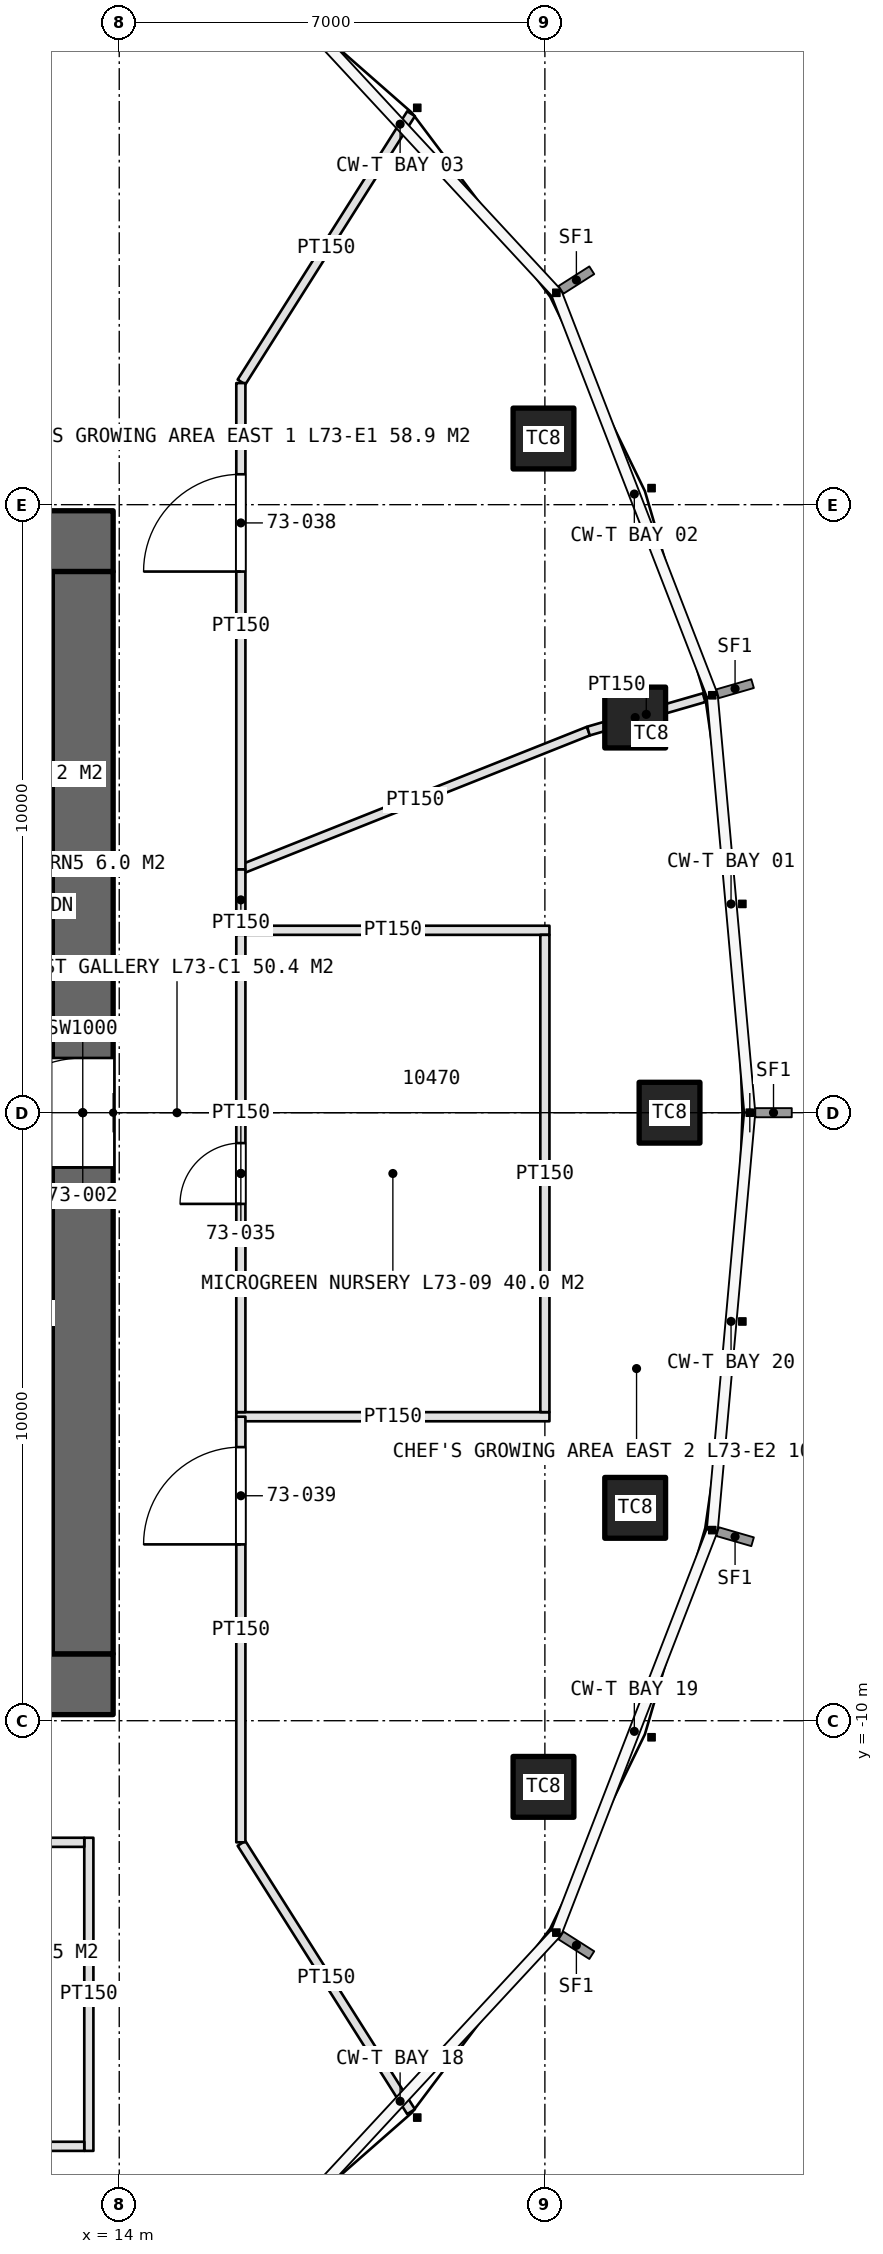
"""IFC4 building model, lengths in metres.
Left out: names, types, materials, properties, quantities, classifications, styles, units other than length and angle.
Written with IfcOpenShell. Run it as: python <this file> out.ifc"""

import sys

from ifc_helpers import new_model, si_unit, direction, frame, frame_2d, origin, origin_2d, place, context, subcontext, project, spatial, rectangle, extrude, element, fill, save


model = new_model("IFC4")
c1 = context("Model", 3, precision=1e-05, world=origin(), true_north=direction((0.0, 1.0)))
c2 = subcontext(c1, "Body", "Model", "MODEL_VIEW")
j1 = project(units=[si_unit("LENGTHUNIT", "METRE"), si_unit("PLANEANGLEUNIT", "RADIAN")], contexts=[c1])
p1 = place(None, origin())
s1 = spatial("IfcSite", under=j1, at=p1, CompositionType="ELEMENT")
p2 = place(p1, origin())
s2 = spatial("IfcBuilding", under=s1, at=p2, CompositionType="ELEMENT")
p3 = place(p2, frame((0.0, 0.0, 325.8)))
s3 = spatial("IfcBuildingStorey", under=s2, at=p3, CompositionType="ELEMENT", Elevation=325.8)
p4 = place(p3, frame((-13.9, -9.4, 0.0), z_axis=(0.0, 0.0, 1.0), x_axis=(1.0, 0.0, 0.0)))
e1 = element("IfcWall", 1, at=p4, inside=s3, PredefinedType="SHEAR", context=c2, shape_type="SweptSolid", body=[
    extrude(rectangle(XDim=27.8, YDim=1.0, at=frame_2d((13.9, 0.0))), origin(), (0.0, 0.0, 1.0), 4.2),
])
p5 = place(p4, frame((22.95, 0.0, 0.0)))
e2 = element("IfcOpeningElement", 2, at=p5, cuts=e1, PredefinedType="OPENING", context=c2, shape_type="SweptSolid", body=[
    extrude(rectangle(XDim=2.2, YDim=2.7, at=frame_2d((1.1, 1.35))), frame((0.0, 0.51, 0.0), z_axis=(0.0, -1.0, 0.0), x_axis=(1.0, 0.0, 0.0)), (0.0, 0.0, 1.0), 1.02),
])
p6 = place(p3, frame((13.9, 9.4, 0.0), z_axis=(0.0, 0.0, 1.0), x_axis=(-1.0, 0.0, 0.0)))
e3 = element("IfcWall", 3, at=p6, inside=s3, PredefinedType="SHEAR", context=c2, shape_type="SweptSolid", body=[
    extrude(rectangle(XDim=27.8, YDim=1.0, at=frame_2d((13.9, 0.0))), origin(), (0.0, 0.0, 1.0), 4.2),
])
p7 = place(p6, frame((23.9, 0.0, 0.0)))
e4 = element("IfcOpeningElement", 4, at=p7, cuts=e3, PredefinedType="OPENING", context=c2, shape_type="SweptSolid", body=[
    extrude(rectangle(XDim=1.0, YDim=2.4, at=frame_2d((0.5, 1.2))), frame((0.0, 0.51, 0.0), z_axis=(0.0, -1.0, 0.0), x_axis=(1.0, 0.0, 0.0)), (0.0, 0.0, 1.0), 1.02),
])
p8 = place(p6, frame((13.0, 0.0, 0.0)))
e5 = element("IfcOpeningElement", 5, at=p8, cuts=e3, PredefinedType="OPENING", context=c2, shape_type="SweptSolid", body=[
    extrude(rectangle(XDim=1.8, YDim=2.4, at=frame_2d((0.9, 1.2))), frame((0.0, 0.51, 0.0), z_axis=(0.0, -1.0, 0.0), x_axis=(1.0, 0.0, 0.0)), (0.0, 0.0, 1.0), 1.02),
])
p9 = place(p3, frame((13.4, -8.9, 0.0), z_axis=(0.0, 0.0, 1.0), x_axis=(0.0, 1.0, 0.0)))
e6 = element("IfcWall", 6, at=p9, inside=s3, PredefinedType="SHEAR", context=c2, shape_type="SweptSolid", body=[
    extrude(rectangle(XDim=17.8, YDim=1.0, at=frame_2d((8.9, 0.0))), origin(), (0.0, 0.0, 1.0), 4.2),
])
p10 = place(p9, frame((8.0, 0.0, 0.0)))
e7 = element("IfcOpeningElement", 7, at=p10, cuts=e6, PredefinedType="OPENING", context=c2, shape_type="SweptSolid", body=[
    extrude(rectangle(XDim=1.8, YDim=2.4, at=frame_2d((0.9, 1.2))), frame((0.0, 0.51, 0.0), z_axis=(0.0, -1.0, 0.0), x_axis=(1.0, 0.0, 0.0)), (0.0, 0.0, 1.0), 1.02),
])
p11 = place(p3, frame((7.2, 1.6, 0.0), z_axis=(0.0, 0.0, 1.0), x_axis=(1.0, 0.0, 0.0)))
e8 = element("IfcWall", 8, at=p11, inside=s3, PredefinedType="SHEAR", context=c2, shape_type="SweptSolid", body=[
    extrude(rectangle(XDim=5.7, YDim=0.4, at=frame_2d((2.85, 0.0))), origin(), (0.0, 0.0, 1.0), 4.2),
])
p12 = place(p11, frame((0.7, 0.0, 0.0)))
e9 = element("IfcOpeningElement", 9, at=p12, cuts=e8, PredefinedType="OPENING", context=c2, shape_type="SweptSolid", body=[
    extrude(rectangle(XDim=1.0, YDim=2.4, at=frame_2d((0.5, 1.2))), frame((0.0, 0.21, 0.0), z_axis=(0.0, -1.0, 0.0), x_axis=(1.0, 0.0, 0.0)), (0.0, 0.0, 1.0), 0.42),
])
p13 = place(p3, frame((7.2, -1.6, 0.0), z_axis=(0.0, 0.0, 1.0), x_axis=(1.0, 0.0, 0.0)))
e10 = element("IfcWall", 10, at=p13, inside=s3, PredefinedType="SHEAR", context=c2, shape_type="SweptSolid", body=[
    extrude(rectangle(XDim=5.7, YDim=0.4, at=frame_2d((2.85, 0.0))), origin(), (0.0, 0.0, 1.0), 4.2),
])
p14 = place(p13, frame((0.9, 0.0, 0.0)))
e11 = element("IfcOpeningElement", 11, at=p14, cuts=e10, PredefinedType="OPENING", context=c2, shape_type="SweptSolid", body=[
    extrude(rectangle(XDim=1.3, YDim=2.4, at=frame_2d((0.65, 1.2))), frame((0.0, 0.21, 0.0), z_axis=(0.0, -1.0, 0.0), x_axis=(1.0, 0.0, 0.0)), (0.0, 0.0, 1.0), 0.42),
])
p15 = place(p13, frame((3.95, 0.0, 0.0)))
e12 = element("IfcOpeningElement", 12, at=p15, cuts=e10, PredefinedType="OPENING", context=c2, shape_type="SweptSolid", body=[
    extrude(rectangle(XDim=1.3, YDim=2.4, at=frame_2d((0.65, 1.2))), frame((0.0, 0.21, 0.0), z_axis=(0.0, -1.0, 0.0), x_axis=(1.0, 0.0, 0.0)), (0.0, 0.0, 1.0), 0.42),
])
p16 = place(p3, frame((7.2, -5.0, 0.0), z_axis=(0.0, 0.0, 1.0), x_axis=(1.0, 0.0, 0.0)))
e13 = element("IfcWall", 13, at=p16, inside=s3, PredefinedType="SHEAR", context=c2, shape_type="SweptSolid", body=[
    extrude(rectangle(XDim=5.7, YDim=0.4, at=frame_2d((2.85, 0.0))), origin(), (0.0, 0.0, 1.0), 4.2),
])
for number, where, z_axis, x_axis in (
    (14, (23.05, 0.0, 0.0), (0.0, 0.0, 1.0), (1.0, 0.0, 0.0)),
    (15, (22.485, 6.499, 0.0), (0.0, 0.0, 1.0), (1.0, 0.0, 0.0)),
    (16, (20.977, 11.088, 0.0), (0.0, 0.0, 1.0), (1.0, 0.0, 0.0)),
    (17, (20.977, -11.088, 0.0), (0.0, 0.0, 1.0), (1.0, 0.0, 0.0)),
    (18, (22.485, -6.499, 0.0), (0.0, 0.0, 1.0), (1.0, 0.0, 0.0)),
):
    element("IfcColumn", number, at=place(p3, frame(where, z_axis=z_axis, x_axis=x_axis)), inside=s3, PredefinedType="COLUMN", context=c2, shape_type="SweptSolid", body=[
        extrude(rectangle(XDim=1.0, YDim=1.0, at=origin_2d()), origin(), (0.0, 0.0, 1.0), 4.2),
    ])
for number, where, z_axis, x_axis in (
    (19, (15.925, -5.0, 0.0), (0.0, 0.0, 1.0), (1.0, 0.0, 0.0)),
    (20, (15.925, 3.0, 0.0), (0.0, 0.0, 1.0), (1.0, 0.0, 0.0)),
):
    element("IfcWall", number, at=place(p3, frame(where, z_axis=z_axis, x_axis=x_axis)), inside=s3, PredefinedType="PARTITIONING", context=c2, shape_type="SweptSolid", body=[
        extrude(rectangle(XDim=5.15, YDim=0.15, at=frame_2d((2.575, 0.0))), origin(), (0.0, 0.0, 1.0), 3.0),
    ])
p17 = place(p3, frame((16.0, -4.925, 0.0), z_axis=(0.0, 0.0, 1.0), x_axis=(0.0, 1.0, 0.0)))
e21 = element("IfcWall", 21, at=p17, inside=s3, PredefinedType="PARTITIONING", context=c2, shape_type="SweptSolid", body=[
    extrude(rectangle(XDim=7.85, YDim=0.15, at=frame_2d((3.925, 0.0))), origin(), (0.0, 0.0, 1.0), 3.0),
])
p18 = place(p17, frame((3.425, 0.0, 0.0)))
e22 = element("IfcOpeningElement", 22, at=p18, cuts=e21, PredefinedType="OPENING", context=c2, shape_type="SweptSolid", body=[
    extrude(rectangle(XDim=1.0, YDim=2.2, at=frame_2d((0.5, 1.1))), frame((0.0, 0.085, 0.0), z_axis=(0.0, -1.0, 0.0), x_axis=(1.0, 0.0, 0.0)), (0.0, 0.0, 1.0), 0.17),
])
p19 = place(p3, frame((21.0, -4.925, 0.0), z_axis=(0.0, 0.0, 1.0), x_axis=(0.0, 1.0, 0.0)))
e23 = element("IfcWall", 23, at=p19, inside=s3, PredefinedType="PARTITIONING", context=c2, shape_type="SweptSolid", body=[
    extrude(rectangle(XDim=7.85, YDim=0.15, at=frame_2d((3.925, 0.0))), origin(), (0.0, 0.0, 1.0), 3.0),
])
p20 = place(p3, frame((13.5, -11.925, 0.0), z_axis=(0.0, 0.0, 1.0), x_axis=(0.0, -1.0, 0.0)))
e24 = element("IfcWall", 24, at=p20, inside=s3, PredefinedType="PARTITIONING", context=c2, shape_type="SweptSolid", body=[
    extrude(rectangle(XDim=5.15, YDim=0.15, at=frame_2d((2.575, 0.0))), origin(), (0.0, 0.0, 1.0), 3.0),
])
p21 = place(p3, frame((10.075, -12.0, 0.0), z_axis=(0.0, 0.0, 1.0), x_axis=(1.0, 0.0, 0.0)))
e25 = element("IfcWall", 25, at=p21, inside=s3, PredefinedType="PARTITIONING", context=c2, shape_type="SweptSolid", body=[
    extrude(rectangle(XDim=3.35, YDim=0.15, at=frame_2d((1.675, 0.0))), origin(), (0.0, 0.0, 1.0), 3.0),
])
p22 = place(p21, frame((1.175, 0.0, 0.0)))
e26 = element("IfcOpeningElement", 26, at=p22, cuts=e25, PredefinedType="OPENING", context=c2, shape_type="SweptSolid", body=[
    extrude(rectangle(XDim=1.0, YDim=2.2, at=frame_2d((0.5, 1.1))), frame((0.0, 0.085, 0.0), z_axis=(0.0, -1.0, 0.0), x_axis=(1.0, 0.0, 0.0)), (0.0, 0.0, 1.0), 0.17),
])
p23 = place(p3, frame((10.075, -17.0, 0.0), z_axis=(0.0, 0.0, 1.0), x_axis=(1.0, 0.0, 0.0)))
e27 = element("IfcWall", 27, at=p23, inside=s3, PredefinedType="PARTITIONING", context=c2, shape_type="SweptSolid", body=[
    extrude(rectangle(XDim=3.35, YDim=0.15, at=frame_2d((1.675, 0.0))), origin(), (0.0, 0.0, 1.0), 3.0),
])
for number, where, z_axis, x_axis in (
    (28, (16.011, -12.017, 0.0), (0.0, 0.0, 1.0), (0.534, -0.845, 0.0)),
    (29, (16.011, 12.017, 0.0), (0.0, 0.0, 1.0), (0.534, 0.845, 0.0)),
):
    element("IfcWall", number, at=place(p3, frame(where, z_axis=z_axis, x_axis=x_axis)), inside=s3, PredefinedType="PARTITIONING", context=c2, shape_type="SweptSolid", body=[
        extrude(rectangle(XDim=5.22, YDim=0.15, at=frame_2d((2.61, 0.0))), origin(), (0.0, 0.0, 1.0), 3.0),
    ])
p24 = place(p3, frame((16.02, 4.008, 0.0), z_axis=(0.0, 0.0, 1.0), x_axis=(0.929035834071, 0.36998975528, 0.0)))
e30 = element("IfcWall", 30, at=p24, inside=s3, PredefinedType="PARTITIONING", context=c2, shape_type="SweptSolid", body=[
    extrude(rectangle(XDim=6.131, YDim=0.15, at=frame_2d((3.066, 0.0))), origin(), (0.0, 0.0, 1.0), 3.0),
])
p25 = place(p3, frame((21.716, 6.277, 0.0), z_axis=(0.0, 0.0, 1.0), x_axis=(0.960705414675, 0.277570002366, 0.0)))
e31 = element("IfcWall", 31, at=p25, inside=s3, PredefinedType="PARTITIONING", context=c2, shape_type="SweptSolid", body=[
    extrude(rectangle(XDim=1.98, YDim=0.15, at=frame_2d((0.99, 0.0))), origin(), (0.0, 0.0, 1.0), 3.0),
])
p26 = place(p3, frame((16.0, 4.0, 0.0), z_axis=(0.0, 0.0, 1.0), x_axis=(0.0, 1.0, 0.0)))
e32 = element("IfcWall", 32, at=p26, inside=s3, PredefinedType="PARTITIONING", context=c2, shape_type="SweptSolid", body=[
    extrude(rectangle(XDim=8.0, YDim=0.15, at=frame_2d((4.0, 0.0))), origin(), (0.0, 0.0, 1.0), 3.0),
])
p27 = place(p26, frame((4.9, 0.0, 0.0)))
e33 = element("IfcOpeningElement", 33, at=p27, cuts=e32, PredefinedType="OPENING", context=c2, shape_type="SweptSolid", body=[
    extrude(rectangle(XDim=1.6, YDim=2.4, at=frame_2d((0.8, 1.2))), frame((0.0, 0.085, 0.0), z_axis=(0.0, -1.0, 0.0), x_axis=(1.0, 0.0, 0.0)), (0.0, 0.0, 1.0), 0.17),
])
p28 = place(p3, frame((16.0, -12.0, 0.0), z_axis=(0.0, 0.0, 1.0), x_axis=(0.0, 1.0, 0.0)))
e34 = element("IfcWall", 34, at=p28, inside=s3, PredefinedType="PARTITIONING", context=c2, shape_type="SweptSolid", body=[
    extrude(rectangle(XDim=7.0, YDim=0.15, at=frame_2d((3.5, 0.0))), origin(), (0.0, 0.0, 1.0), 3.0),
])
p29 = place(p28, frame((4.9, 0.0, 0.0)))
e35 = element("IfcOpeningElement", 35, at=p29, cuts=e34, PredefinedType="OPENING", context=c2, shape_type="SweptSolid", body=[
    extrude(rectangle(XDim=1.6, YDim=2.4, at=frame_2d((0.8, 1.2))), frame((0.0, 0.085, 0.0), z_axis=(0.0, -1.0, 0.0), x_axis=(1.0, 0.0, 0.0)), (0.0, 0.0, 1.0), 0.17),
])
p30 = place(p3, frame((16.0, 3.0, 0.0), z_axis=(0.0, 0.0, 1.0), x_axis=(0.0, 1.0, 0.0)))
e36 = element("IfcWall", 36, at=p30, inside=s3, PredefinedType="PARTITIONING", context=c2, shape_type="SweptSolid", body=[
    extrude(rectangle(XDim=1.0, YDim=0.15, at=frame_2d((0.5, 0.0))), origin(), (0.0, 0.0, 1.0), 3.0),
])
p31 = place(p10, origin())
e37 = element("IfcDoor", 37, at=p31, inside=s3, OperationType="DOUBLE_DOOR_SINGLE_SWING", PredefinedType="DOOR", context=c2, shape_type="SweptSolid", body=[
    extrude(rectangle(XDim=1.8, YDim=2.4, at=frame_2d((0.9, 1.2))), frame((0.0, 0.025, 0.0), z_axis=(0.0, -1.0, 0.0), x_axis=(1.0, 0.0, 0.0)), (0.0, 0.0, 1.0), 0.05),
])
fill(e7, e37)
p32 = place(p18, origin())
e38 = element("IfcDoor", 38, at=p32, inside=s3, OperationType="SINGLE_SWING_LEFT", PredefinedType="DOOR", context=c2, shape_type="SweptSolid", body=[
    extrude(rectangle(XDim=1.0, YDim=2.2, at=frame_2d((0.5, 1.1))), frame((0.0, 0.025, 0.0), z_axis=(0.0, -1.0, 0.0), x_axis=(1.0, 0.0, 0.0)), (0.0, 0.0, 1.0), 0.05),
])
fill(e22, e38)
p33 = place(p27, origin())
e39 = element("IfcDoor", 39, at=p33, inside=s3, OperationType="DOUBLE_DOOR_SINGLE_SWING", PredefinedType="DOOR", context=c2, shape_type="SweptSolid", body=[
    extrude(rectangle(XDim=1.6, YDim=2.4, at=frame_2d((0.8, 1.2))), frame((0.0, 0.025, 0.0), z_axis=(0.0, -1.0, 0.0), x_axis=(1.0, 0.0, 0.0)), (0.0, 0.0, 1.0), 0.05),
])
fill(e33, e39)
p34 = place(p29, origin())
e40 = element("IfcDoor", 40, at=p34, inside=s3, OperationType="DOUBLE_DOOR_SINGLE_SWING", PredefinedType="DOOR", context=c2, shape_type="SweptSolid", body=[
    extrude(rectangle(XDim=1.6, YDim=2.4, at=frame_2d((0.8, 1.2))), frame((0.0, 0.025, 0.0), z_axis=(0.0, -1.0, 0.0), x_axis=(1.0, 0.0, 0.0)), (0.0, 0.0, 1.0), 0.05),
])
fill(e35, e40)
save(model, sys.argv[1])
